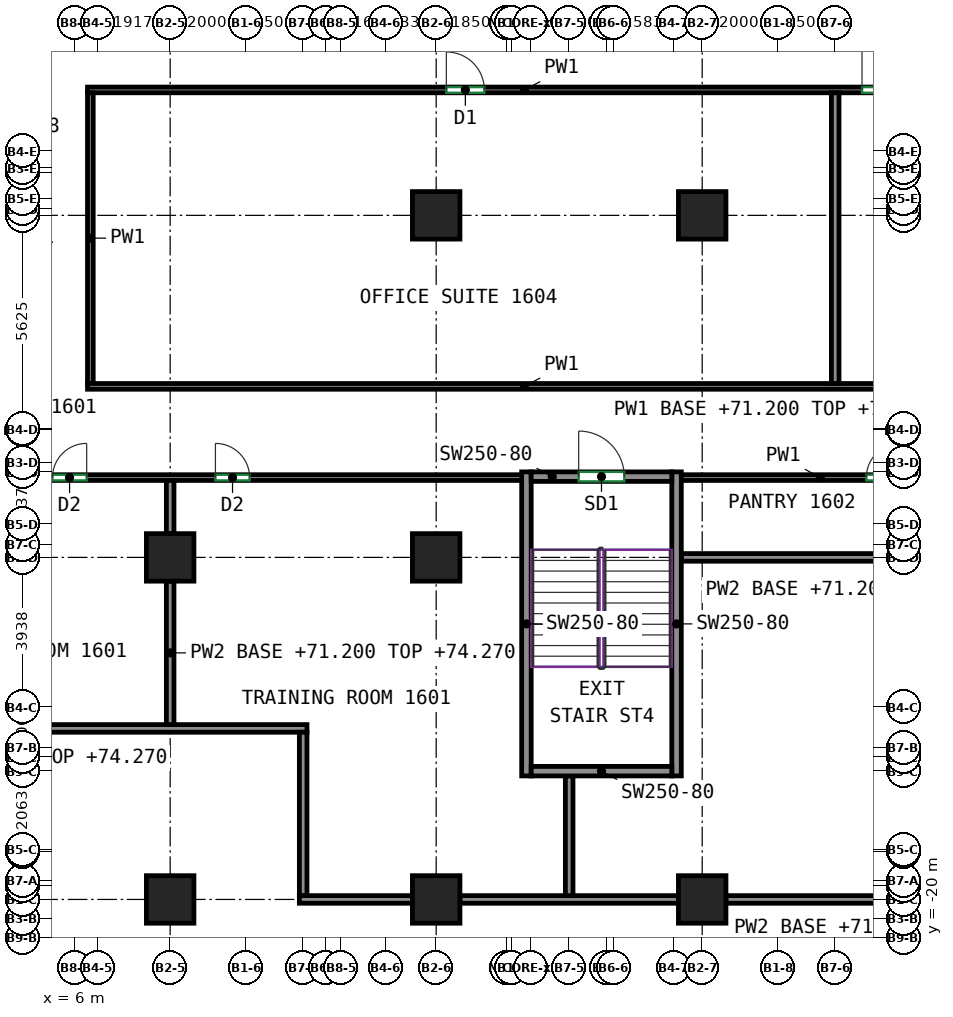
"""IFC4 building model, lengths in metres.
Left out: names, types, materials, properties, quantities, classifications, styles, units other than length and angle.
Written with IfcOpenShell. Run it as: python <this file> out.ifc"""

import sys

from ifc_helpers import new_model, si_unit, direction, frame, frame_2d, origin, origin_2d, place, context, subcontext, project, spatial, rectangle, extrude, source, transform, mapped, element, fill, save


model = new_model("IFC4")
c1 = context("Model", 3, precision=1e-05, world=origin(), true_north=direction((0.0, 1.0)))
c2 = subcontext(c1, "Body", "Model", "MODEL_VIEW")
j1 = project(units=[si_unit("LENGTHUNIT", "METRE"), si_unit("PLANEANGLEUNIT", "RADIAN")], contexts=[c1])
p1 = place(None, origin())
s1 = spatial("IfcSite", under=j1, at=p1, CompositionType="ELEMENT")
p2 = place(p1, origin())
s2 = spatial("IfcBuilding", under=s1, at=p2, CompositionType="ELEMENT")
p3 = place(p2, frame((0.0, 0.0, 71.2)))
s3 = spatial("IfcBuildingStorey", under=s2, at=p3, CompositionType="ELEMENT", Elevation=71.2)
m1 = source(origin(), c2, "Body", "SweptSolid", [
    extrude(rectangle(XDim=1.25, YDim=1.25, at=origin_2d()), origin(), (0.0, 0.0, 1.0), 3.72),
])
for number, where, z_axis, x_axis in (
    (1, (8.5, -19.0, 0.0), (0.0, 0.0, 1.0), (1.0, 0.0, 0.0)),
    (2, (8.5, -10.0, 0.0), (0.0, 0.0, 1.0), (1.0, 0.0, 0.0)),
    (3, (15.5, -19.0, 0.0), (0.0, 0.0, 1.0), (1.0, 0.0, 0.0)),
    (4, (15.5, -10.0, 0.0), (0.0, 0.0, 1.0), (1.0, 0.0, 0.0)),
    (5, (15.5, -1.0, 0.0), (0.0, 0.0, 1.0), (1.0, 0.0, 0.0)),
    (6, (22.5, -19.0, 0.0), (0.0, 0.0, 1.0), (1.0, 0.0, 0.0)),
    (7, (22.5, -1.0, 0.0), (0.0, 0.0, 1.0), (1.0, 0.0, 0.0)),
):
    element("IfcColumn", number, at=place(p3, frame(where, z_axis=z_axis, x_axis=x_axis)), inside=s3, PredefinedType="COLUMN", context=c2, shape_type="MappedRepresentation", body=[
        mapped(m1, transform((0.0, 0.0, 0.0))),
    ])
m2 = source(origin(), c2, "Body", "SweptSolid", [
    extrude(rectangle(XDim=8.0, YDim=0.25, at=frame_2d((4.0, 0.0))), origin(), (0.0, 0.0, 1.0), 3.72),
])
for number, where, z_axis, x_axis in (
    (8, (17.875, -15.75, 0.0), (0.0, 0.0, 1.0), (0.0, 1.0, 0.0)),
    (9, (21.825, -15.75, 0.0), (0.0, 0.0, 1.0), (0.0, 1.0, 0.0)),
):
    element("IfcWall", number, at=place(p3, frame(where, z_axis=z_axis, x_axis=x_axis)), inside=s3, PredefinedType="SHEAR", context=c2, shape_type="MappedRepresentation", body=[
        mapped(m2, transform((0.0, 0.0, 0.0))),
    ])
m3 = source(origin(), c2, "Body", "SweptSolid", [
    extrude(rectangle(XDim=3.7, YDim=0.25, at=frame_2d((1.85, 0.0))), origin(), (0.0, 0.0, 1.0), 3.72),
])
p4 = place(p3, frame((18.0, -15.625, 0.0), z_axis=(0.0, 0.0, 1.0), x_axis=(1.0, 0.0, 0.0)))
e10 = element("IfcWall", 10, at=p4, inside=s3, PredefinedType="SHEAR", context=c2, shape_type="MappedRepresentation", body=[
    mapped(m3, transform((0.0, 0.0, 0.0))),
])
p5 = place(p3, frame((18.0, -7.875, 0.0), z_axis=(0.0, 0.0, 1.0), x_axis=(1.0, 0.0, 0.0)))
e11 = element("IfcWall", 11, at=p5, inside=s3, PredefinedType="SHEAR", context=c2, shape_type="MappedRepresentation", body=[
    mapped(m3, transform((0.0, 0.0, 0.0))),
])
p6 = place(p5, frame((1.25, 0.0, 0.0)))
e12 = element("IfcOpeningElement", 12, at=p6, cuts=e11, PredefinedType="OPENING", context=c2, shape_type="SweptSolid", body=[
    extrude(rectangle(XDim=1.2, YDim=2.1, at=frame_2d((0.6, 1.05))), frame((0.0, 0.135, 0.0), z_axis=(0.0, -1.0, 0.0), x_axis=(1.0, 0.0, 0.0)), (0.0, 0.0, 1.0), 0.27),
])
p7 = place(p3, frame((-13.6, -7.9, 0.0), z_axis=(0.0, 0.0, 1.0), x_axis=(1.0, 0.0, 0.0)))
e13 = element("IfcWall", 13, at=p7, inside=s3, PredefinedType="PARTITIONING", context=c2, shape_type="SweptSolid", body=[
    extrude(rectangle(XDim=31.4, YDim=0.15, at=frame_2d((15.7, 0.0))), origin(), (0.0, 0.0, 1.0), 3.72),
])
p8 = place(p7, frame((11.501, 0.0, 0.0)))
e14 = element("IfcOpeningElement", 14, at=p8, cuts=e13, PredefinedType="OPENING", context=c2, shape_type="SweptSolid", body=[
    extrude(rectangle(XDim=0.9, YDim=2.1, at=frame_2d((0.45, 1.05))), frame((0.0, 0.085, 0.0), z_axis=(0.0, -1.0, 0.0), x_axis=(1.0, 0.0, 0.0)), (0.0, 0.0, 1.0), 0.17),
])
p9 = place(p7, frame((19.003, 0.0, 0.0)))
e15 = element("IfcOpeningElement", 15, at=p9, cuts=e13, PredefinedType="OPENING", context=c2, shape_type="SweptSolid", body=[
    extrude(rectangle(XDim=0.9, YDim=2.1, at=frame_2d((0.45, 1.05))), frame((0.0, 0.085, 0.0), z_axis=(0.0, -1.0, 0.0), x_axis=(1.0, 0.0, 0.0)), (0.0, 0.0, 1.0), 0.17),
])
p10 = place(p7, frame((23.291, 0.0, 0.0)))
e16 = element("IfcOpeningElement", 16, at=p10, cuts=e13, PredefinedType="OPENING", context=c2, shape_type="SweptSolid", body=[
    extrude(rectangle(XDim=0.9, YDim=2.1, at=frame_2d((0.45, 1.05))), frame((0.0, 0.085, 0.0), z_axis=(0.0, -1.0, 0.0), x_axis=(1.0, 0.0, 0.0)), (0.0, 0.0, 1.0), 0.17),
])
p11 = place(p3, frame((6.325, 2.3, 0.0), z_axis=(0.0, 0.0, 1.0), x_axis=(1.0, 0.0, 0.0)))
e17 = element("IfcWall", 17, at=p11, inside=s3, PredefinedType="PARTITIONING", context=c2, shape_type="SweptSolid", body=[
    extrude(rectangle(XDim=23.0, YDim=0.15, at=frame_2d((11.5, 0.0))), origin(), (0.0, 0.0, 1.0), 3.72),
])
p12 = place(p11, frame((9.443, 0.0, 0.0)))
e18 = element("IfcOpeningElement", 18, at=p12, cuts=e17, PredefinedType="OPENING", context=c2, shape_type="SweptSolid", body=[
    extrude(rectangle(XDim=1.0, YDim=2.1, at=frame_2d((0.5, 1.05))), frame((0.0, 0.085, 0.0), z_axis=(0.0, -1.0, 0.0), x_axis=(1.0, 0.0, 0.0)), (0.0, 0.0, 1.0), 0.17),
])
p13 = place(p11, frame((20.381, 0.0, 0.0)))
e19 = element("IfcOpeningElement", 19, at=p13, cuts=e17, PredefinedType="OPENING", context=c2, shape_type="SweptSolid", body=[
    extrude(rectangle(XDim=1.8, YDim=2.1, at=frame_2d((0.9, 1.05))), frame((0.0, 0.085, 0.0), z_axis=(0.0, -1.0, 0.0), x_axis=(1.0, 0.0, 0.0)), (0.0, 0.0, 1.0), 0.17),
])
p14 = place(p3, frame((6.4, -5.425, 0.0), z_axis=(0.0, 0.0, 1.0), x_axis=(0.0, 1.0, 0.0)))
e20 = element("IfcWall", 20, at=p14, inside=s3, PredefinedType="PARTITIONING", context=c2, shape_type="SweptSolid", body=[
    extrude(rectangle(XDim=7.65, YDim=0.15, at=frame_2d((3.825, 0.0))), origin(), (0.0, 0.0, 1.0), 3.72),
])
p15 = place(p3, frame((6.325, -5.5, 0.0), z_axis=(0.0, 0.0, 1.0), x_axis=(1.0, 0.0, 0.0)))
e21 = element("IfcWall", 21, at=p15, inside=s3, PredefinedType="PARTITIONING", context=c2, shape_type="SweptSolid", body=[
    extrude(rectangle(XDim=23.0, YDim=0.15, at=frame_2d((11.5, 0.0))), origin(), (0.0, 0.0, 1.0), 3.72),
])
p16 = place(p3, frame((21.9, -7.9, 0.0), z_axis=(0.0, 0.0, 1.0), x_axis=(1.0, 0.0, 0.0)))
e22 = element("IfcWall", 22, at=p16, inside=s3, PredefinedType="PARTITIONING", context=c2, shape_type="SweptSolid", body=[
    extrude(rectangle(XDim=7.425, YDim=0.15, at=frame_2d((3.712, 0.0))), origin(), (0.0, 0.0, 1.0), 3.72),
])
p17 = place(p16, frame((4.919, 0.0, 0.0)))
e23 = element("IfcOpeningElement", 23, at=p17, cuts=e22, PredefinedType="OPENING", context=c2, shape_type="SweptSolid", body=[
    extrude(rectangle(XDim=0.9, YDim=2.1, at=frame_2d((0.45, 1.05))), frame((0.0, 0.085, 0.0), z_axis=(0.0, -1.0, 0.0), x_axis=(1.0, 0.0, 0.0)), (0.0, 0.0, 1.0), 0.17),
])
p18 = place(p3, frame((-5.6, -14.5, 0.0), z_axis=(0.0, 0.0, 1.0), x_axis=(1.0, 0.0, 0.0)))
e24 = element("IfcWall", 24, at=p18, inside=s3, PredefinedType="PARTITIONING", context=c2, shape_type="SweptSolid", body=[
    extrude(rectangle(XDim=17.7, YDim=0.2, at=frame_2d((8.85, 0.0))), origin(), (0.0, 0.0, 1.0), 3.72),
])
p19 = place(p3, frame((12.0, -18.9, 0.0), z_axis=(0.0, 0.0, 1.0), x_axis=(0.0, 1.0, 0.0)))
e25 = element("IfcWall", 25, at=p19, inside=s3, PredefinedType="PARTITIONING", context=c2, shape_type="SweptSolid", body=[
    extrude(rectangle(XDim=4.3, YDim=0.2, at=frame_2d((2.15, 0.0))), origin(), (0.0, 0.0, 1.0), 3.72),
])
p20 = place(p3, frame((11.9, -19.0, 0.0), z_axis=(0.0, 0.0, 1.0), x_axis=(1.0, 0.0, 0.0)))
e26 = element("IfcWall", 26, at=p20, inside=s3, PredefinedType="PARTITIONING", context=c2, shape_type="SweptSolid", body=[
    extrude(rectangle(XDim=2.975, YDim=0.2, at=frame_2d((1.488, 0.0))), origin(), (0.0, 0.0, 1.0), 3.72),
])
p21 = place(p3, frame((16.125, -19.0, 0.0), z_axis=(0.0, 0.0, 1.0), x_axis=(1.0, 0.0, 0.0)))
e27 = element("IfcWall", 27, at=p21, inside=s3, PredefinedType="PARTITIONING", context=c2, shape_type="SweptSolid", body=[
    extrude(rectangle(XDim=5.75, YDim=0.2, at=frame_2d((2.875, 0.0))), origin(), (0.0, 0.0, 1.0), 3.72),
])
p22 = place(p3, frame((23.125, -19.0, 0.0), z_axis=(0.0, 0.0, 1.0), x_axis=(1.0, 0.0, 0.0)))
e28 = element("IfcWall", 28, at=p22, inside=s3, PredefinedType="PARTITIONING", context=c2, shape_type="SweptSolid", body=[
    extrude(rectangle(XDim=8.975, YDim=0.2, at=frame_2d((4.488, 0.0))), origin(), (0.0, 0.0, 1.0), 3.07),
])
p23 = place(p3, frame((8.5, -9.375, 0.0), z_axis=(0.0, 0.0, 1.0), x_axis=(0.0, 1.0, 0.0)))
e29 = element("IfcWall", 29, at=p23, inside=s3, PredefinedType="PARTITIONING", context=c2, shape_type="SweptSolid", body=[
    extrude(rectangle(XDim=1.399, YDim=0.2, at=frame_2d((0.699, 0.0))), origin(), (0.0, 0.0, 1.0), 3.72),
])
p24 = place(p3, frame((8.5, -14.4, 0.0), z_axis=(0.0, 0.0, 1.0), x_axis=(0.0, 1.0, 0.0)))
e30 = element("IfcWall", 30, at=p24, inside=s3, PredefinedType="PARTITIONING", context=c2, shape_type="SweptSolid", body=[
    extrude(rectangle(XDim=3.775, YDim=0.2, at=frame_2d((1.887, 0.0))), origin(), (0.0, 0.0, 1.0), 3.07),
])
p25 = place(p3, frame((26.0, -5.424, 0.0), z_axis=(0.0, 0.0, 1.0), x_axis=(0.0, 1.0, 0.0)))
e31 = element("IfcWall", 31, at=p25, inside=s3, PredefinedType="PARTITIONING", context=c2, shape_type="SweptSolid", body=[
    extrude(rectangle(XDim=7.648, YDim=0.2, at=frame_2d((3.824, 0.0))), origin(), (0.0, 0.0, 1.0), 3.72),
])
p26 = place(p3, frame((19.0, -18.9, 0.0), z_axis=(0.0, 0.0, 1.0), x_axis=(0.0, 1.0, 0.0)))
e32 = element("IfcWall", 32, at=p26, inside=s3, PredefinedType="PARTITIONING", context=c2, shape_type="SweptSolid", body=[
    extrude(rectangle(XDim=3.15, YDim=0.2, at=frame_2d((1.575, 0.0))), origin(), (0.0, 0.0, 1.0), 3.72),
])
p27 = place(p3, frame((21.95, -10.0, 0.0), z_axis=(0.0, 0.0, 1.0), x_axis=(1.0, 0.0, 0.0)))
e33 = element("IfcWall", 33, at=p27, inside=s3, PredefinedType="PARTITIONING", context=c2, shape_type="SweptSolid", body=[
    extrude(rectangle(XDim=7.65, YDim=0.2, at=frame_2d((3.825, 0.0))), origin(), (0.0, 0.0, 1.0), 3.72),
])
p28 = place(p6, origin())
e34 = element("IfcDoor", 34, at=p28, inside=s3, OperationType="DOUBLE_DOOR_SINGLE_SWING", PredefinedType="DOOR", context=c2, shape_type="SweptSolid", body=[
    extrude(rectangle(XDim=1.2, YDim=2.1, at=frame_2d((0.6, 1.05))), frame((0.0, 0.025, 0.0), z_axis=(0.0, -1.0, 0.0), x_axis=(1.0, 0.0, 0.0)), (0.0, 0.0, 1.0), 0.05),
])
fill(e12, e34)
p29 = place(p9, origin())
e35 = element("IfcDoor", 35, at=p29, inside=s3, OperationType="SINGLE_SWING_RIGHT", PredefinedType="DOOR", context=c2, shape_type="SweptSolid", body=[
    extrude(rectangle(XDim=0.9, YDim=2.1, at=frame_2d((0.45, 1.05))), frame((0.0, 0.025, 0.0), z_axis=(0.0, -1.0, 0.0), x_axis=(1.0, 0.0, 0.0)), (0.0, 0.0, 1.0), 0.05),
])
fill(e15, e35)
p30 = place(p10, origin())
e36 = element("IfcDoor", 36, at=p30, inside=s3, OperationType="SINGLE_SWING_LEFT", PredefinedType="DOOR", context=c2, shape_type="SweptSolid", body=[
    extrude(rectangle(XDim=0.9, YDim=2.1, at=frame_2d((0.45, 1.05))), frame((0.0, 0.025, 0.0), z_axis=(0.0, -1.0, 0.0), x_axis=(1.0, 0.0, 0.0)), (0.0, 0.0, 1.0), 0.05),
])
fill(e16, e36)
p31 = place(p17, origin())
e37 = element("IfcDoor", 37, at=p31, inside=s3, OperationType="SINGLE_SWING_RIGHT", PredefinedType="DOOR", context=c2, shape_type="SweptSolid", body=[
    extrude(rectangle(XDim=0.9, YDim=2.1, at=frame_2d((0.45, 1.05))), frame((0.0, 0.025, 0.0), z_axis=(0.0, -1.0, 0.0), x_axis=(1.0, 0.0, 0.0)), (0.0, 0.0, 1.0), 0.05),
])
fill(e23, e37)
p32 = place(p12, origin())
e38 = element("IfcDoor", 38, at=p32, inside=s3, OperationType="SINGLE_SWING_LEFT", PredefinedType="DOOR", context=c2, shape_type="SweptSolid", body=[
    extrude(rectangle(XDim=1.0, YDim=2.1, at=frame_2d((0.5, 1.05))), frame((0.0, 0.025, 0.0), z_axis=(0.0, -1.0, 0.0), x_axis=(1.0, 0.0, 0.0)), (0.0, 0.0, 1.0), 0.05),
])
fill(e18, e38)
p33 = place(p13, origin())
e39 = element("IfcDoor", 39, at=p33, inside=s3, OperationType="DOUBLE_DOOR_SINGLE_SWING", PredefinedType="DOOR", context=c2, shape_type="SweptSolid", body=[
    extrude(rectangle(XDim=1.8, YDim=2.1, at=frame_2d((0.9, 1.05))), frame((0.0, 0.025, 0.0), z_axis=(0.0, -1.0, 0.0), x_axis=(1.0, 0.0, 0.0)), (0.0, 0.0, 1.0), 0.05),
])
fill(e19, e39)
save(model, sys.argv[1])
